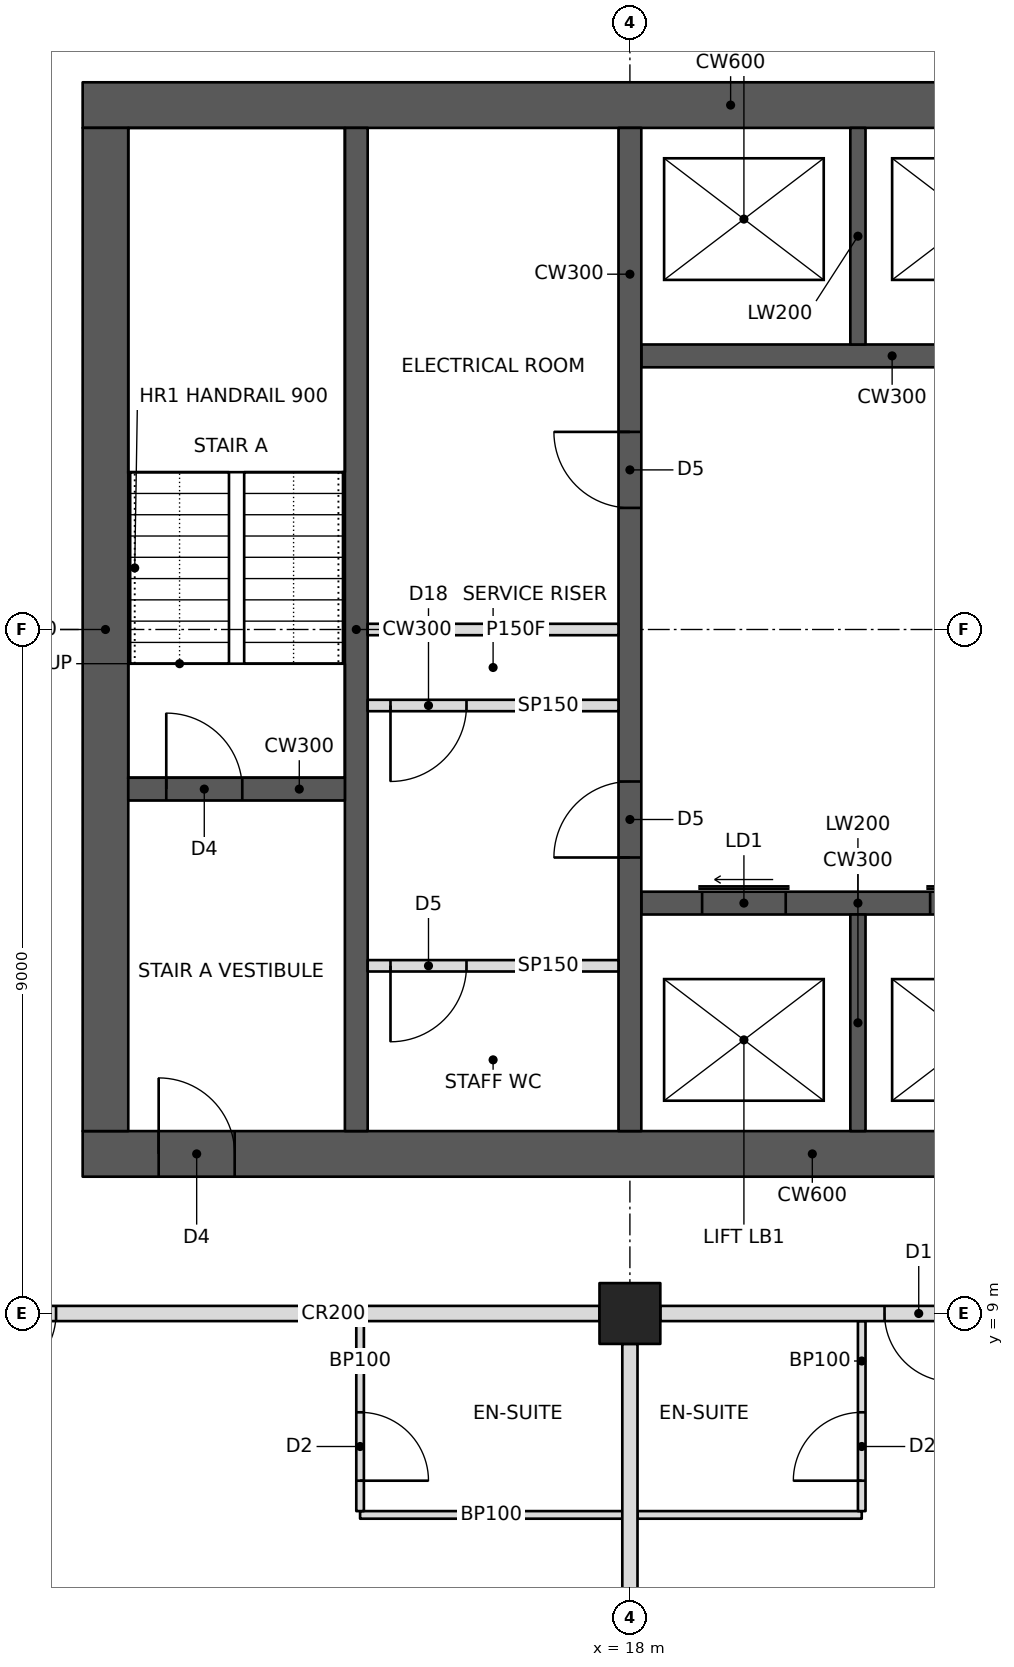
"""IFC4 building model, lengths in metres.
Left out: names, types, materials, properties, quantities, classifications, styles, units other than length and angle.
Written with IfcOpenShell. Run it as: python <this file> out.ifc"""

import sys

from ifc_helpers import new_model, si_unit, direction, frame, frame_2d, origin, origin_2d, place, context, subcontext, project, spatial, rectangle, hollow_rectangle, extrude, element, fill, save


model = new_model("IFC4")
c1 = context("Model", 3, precision=1e-05, world=origin(), true_north=direction((0.0, 1.0)))
c2 = subcontext(c1, "Body", "Model", "MODEL_VIEW")
j1 = project(units=[si_unit("LENGTHUNIT", "METRE"), si_unit("PLANEANGLEUNIT", "RADIAN")], contexts=[c1])
p1 = place(None, origin())
s1 = spatial("IfcSite", under=j1, at=p1, CompositionType="ELEMENT")
p2 = place(p1, origin())
s2 = spatial("IfcBuilding", under=s1, at=p2, CompositionType="ELEMENT")
p3 = place(p2, frame((0.0, 0.0, 148.6)))
s3 = spatial("IfcBuildingStorey", under=s2, at=p3, CompositionType="ELEMENT", Elevation=148.6)
p4 = place(p3, frame((18.0, 9.0, 0.0), z_axis=(0.0, 0.0, 1.0), x_axis=(1.0, 0.0, 0.0)))
e1 = element("IfcColumn", 1, at=p4, inside=s3, PredefinedType="COLUMN", context=c2, shape_type="SweptSolid", body=[
    extrude(hollow_rectangle(XDim=0.8, YDim=0.8, WallThickness=0.07, at=origin_2d()), origin(), (0.0, 0.0, 1.0), 3.4),
])
p5 = place(p3, frame((10.8, 11.1, 0.0), z_axis=(0.0, 0.0, 1.0), x_axis=(1.0, 0.0, 0.0)))
e2 = element("IfcWall", 2, at=p5, inside=s3, PredefinedType="SHEAR", context=c2, shape_type="SweptSolid", body=[
    extrude(rectangle(XDim=23.4, YDim=0.6, at=frame_2d((11.7, 0.0))), origin(), (0.0, 0.0, 1.0), 3.4),
])
p6 = place(p5, frame((1.0, 0.0, 0.0)))
e3 = element("IfcOpeningElement", 3, at=p6, cuts=e2, PredefinedType="OPENING", context=c2, shape_type="SweptSolid", body=[
    extrude(rectangle(XDim=1.0, YDim=2.1, at=frame_2d((0.5, 1.05))), frame((0.0, 0.31, 0.0), z_axis=(0.0, -1.0, 0.0), x_axis=(1.0, 0.0, 0.0)), (0.0, 0.0, 1.0), 0.62),
])
p7 = place(p5, frame((17.2, 0.0, 0.0)))
e4 = element("IfcOpeningElement", 4, at=p7, cuts=e2, PredefinedType="OPENING", context=c2, shape_type="SweptSolid", body=[
    extrude(rectangle(XDim=1.8, YDim=2.1, at=frame_2d((0.9, 1.05))), frame((0.0, 0.31, 0.0), z_axis=(0.0, -1.0, 0.0), x_axis=(1.0, 0.0, 0.0)), (0.0, 0.0, 1.0), 0.62),
])
p8 = place(p3, frame((10.8, 24.9, 0.0), z_axis=(0.0, 0.0, 1.0), x_axis=(1.0, 0.0, 0.0)))
e5 = element("IfcWall", 5, at=p8, inside=s3, PredefinedType="SHEAR", context=c2, shape_type="SweptSolid", body=[
    extrude(rectangle(XDim=23.4, YDim=0.6, at=frame_2d((11.7, 0.0))), origin(), (0.0, 0.0, 1.0), 3.4),
])
p9 = place(p8, frame((17.2, 0.0, 0.0)))
e6 = element("IfcOpeningElement", 6, at=p9, cuts=e5, PredefinedType="OPENING", context=c2, shape_type="SweptSolid", body=[
    extrude(rectangle(XDim=1.8, YDim=2.1, at=frame_2d((0.9, 1.05))), frame((0.0, 0.31, 0.0), z_axis=(0.0, -1.0, 0.0), x_axis=(1.0, 0.0, 0.0)), (0.0, 0.0, 1.0), 0.62),
])
p10 = place(p8, frame((21.1, 0.0, 0.0)))
e7 = element("IfcOpeningElement", 7, at=p10, cuts=e5, PredefinedType="OPENING", context=c2, shape_type="SweptSolid", body=[
    extrude(rectangle(XDim=1.0, YDim=2.1, at=frame_2d((0.5, 1.05))), frame((0.0, 0.31, 0.0), z_axis=(0.0, -1.0, 0.0), x_axis=(1.0, 0.0, 0.0)), (0.0, 0.0, 1.0), 0.62),
])
p11 = place(p3, frame((11.1, 11.4, 0.0), z_axis=(0.0, 0.0, 1.0), x_axis=(0.0, 1.0, 0.0)))
e8 = element("IfcWall", 8, at=p11, inside=s3, PredefinedType="SHEAR", context=c2, shape_type="SweptSolid", body=[
    extrude(rectangle(XDim=13.2, YDim=0.6, at=frame_2d((6.6, 0.0))), origin(), (0.0, 0.0, 1.0), 3.4),
])
p12 = place(p3, frame((14.4, 11.4, 0.0), z_axis=(0.0, 0.0, 1.0), x_axis=(0.0, 1.0, 0.0)))
e9 = element("IfcWall", 9, at=p12, inside=s3, PredefinedType="SHEAR", context=c2, shape_type="SweptSolid", body=[
    extrude(rectangle(XDim=13.2, YDim=0.3, at=frame_2d((6.6, 0.0))), origin(), (0.0, 0.0, 1.0), 3.4),
])
p13 = place(p3, frame((11.4, 15.9, 0.0), z_axis=(0.0, 0.0, 1.0), x_axis=(1.0, 0.0, 0.0)))
e10 = element("IfcWall", 10, at=p13, inside=s3, PredefinedType="SHEAR", context=c2, shape_type="SweptSolid", body=[
    extrude(rectangle(XDim=2.85, YDim=0.3, at=frame_2d((1.425, 0.0))), origin(), (0.0, 0.0, 1.0), 3.4),
])
p14 = place(p13, frame((0.5, 0.0, 0.0)))
e11 = element("IfcOpeningElement", 11, at=p14, cuts=e10, PredefinedType="OPENING", context=c2, shape_type="SweptSolid", body=[
    extrude(rectangle(XDim=1.0, YDim=2.1, at=frame_2d((0.5, 1.05))), frame((0.0, 0.16, 0.0), z_axis=(0.0, -1.0, 0.0), x_axis=(1.0, 0.0, 0.0)), (0.0, 0.0, 1.0), 0.32),
])
p15 = place(p3, frame((18.0, 11.4, 0.0), z_axis=(0.0, 0.0, 1.0), x_axis=(0.0, 1.0, 0.0)))
e12 = element("IfcWall", 12, at=p15, inside=s3, PredefinedType="SHEAR", context=c2, shape_type="SweptSolid", body=[
    extrude(rectangle(XDim=13.2, YDim=0.3, at=frame_2d((6.6, 0.0))), origin(), (0.0, 0.0, 1.0), 3.4),
])
p16 = place(p15, frame((3.6, 0.0, 0.0)))
e13 = element("IfcOpeningElement", 13, at=p16, cuts=e12, PredefinedType="OPENING", context=c2, shape_type="SweptSolid", body=[
    extrude(rectangle(XDim=1.0, YDim=2.1, at=frame_2d((0.5, 1.05))), frame((0.0, 0.16, 0.0), z_axis=(0.0, -1.0, 0.0), x_axis=(1.0, 0.0, 0.0)), (0.0, 0.0, 1.0), 0.32),
])
p17 = place(p15, frame((8.2, 0.0, 0.0)))
e14 = element("IfcOpeningElement", 14, at=p17, cuts=e12, PredefinedType="OPENING", context=c2, shape_type="SweptSolid", body=[
    extrude(rectangle(XDim=1.0, YDim=2.1, at=frame_2d((0.5, 1.05))), frame((0.0, 0.16, 0.0), z_axis=(0.0, -1.0, 0.0), x_axis=(1.0, 0.0, 0.0)), (0.0, 0.0, 1.0), 0.32),
])
p18 = place(p3, frame((14.55, 18.0, 0.0), z_axis=(0.0, 0.0, 1.0), x_axis=(1.0, 0.0, 0.0)))
e15 = element("IfcWall", 15, at=p18, inside=s3, PredefinedType="PARTITIONING", context=c2, shape_type="SweptSolid", body=[
    extrude(rectangle(XDim=3.3, YDim=0.15, at=frame_2d((1.65, 0.0))), origin(), (0.0, 0.0, 1.0), 3.2),
])
p19 = place(p3, frame((18.15, 14.4, 0.0), z_axis=(0.0, 0.0, 1.0), x_axis=(1.0, 0.0, 0.0)))
e16 = element("IfcWall", 16, at=p19, inside=s3, PredefinedType="SHEAR", context=c2, shape_type="SweptSolid", body=[
    extrude(rectangle(XDim=9.0, YDim=0.3, at=frame_2d((4.5, 0.0))), origin(), (0.0, 0.0, 1.0), 3.4),
])
p20 = place(p19, frame((0.8, 0.0, 0.0)))
e17 = element("IfcOpeningElement", 17, at=p20, cuts=e16, PredefinedType="OPENING", context=c2, shape_type="SweptSolid", body=[
    extrude(rectangle(XDim=1.1, YDim=2.1, at=frame_2d((0.55, 1.05))), frame((0.0, 0.16, 0.0), z_axis=(0.0, -1.0, 0.0), x_axis=(1.0, 0.0, 0.0)), (0.0, 0.0, 1.0), 0.32),
])
p21 = place(p19, frame((3.8, 0.0, 0.0)))
e18 = element("IfcOpeningElement", 18, at=p21, cuts=e16, PredefinedType="OPENING", context=c2, shape_type="SweptSolid", body=[
    extrude(rectangle(XDim=1.1, YDim=2.1, at=frame_2d((0.55, 1.05))), frame((0.0, 0.16, 0.0), z_axis=(0.0, -1.0, 0.0), x_axis=(1.0, 0.0, 0.0)), (0.0, 0.0, 1.0), 0.32),
])
p22 = place(p19, frame((6.75, 0.0, 0.0)))
e19 = element("IfcOpeningElement", 19, at=p22, cuts=e16, PredefinedType="OPENING", context=c2, shape_type="SweptSolid", body=[
    extrude(rectangle(XDim=1.2, YDim=2.1, at=frame_2d((0.6, 1.05))), frame((0.0, 0.16, 0.0), z_axis=(0.0, -1.0, 0.0), x_axis=(1.0, 0.0, 0.0)), (0.0, 0.0, 1.0), 0.32),
])
p23 = place(p3, frame((21.0, 11.4, 0.0), z_axis=(0.0, 0.0, 1.0), x_axis=(0.0, 1.0, 0.0)))
e20 = element("IfcWall", 20, at=p23, inside=s3, PredefinedType="SHEAR", context=c2, shape_type="SweptSolid", body=[
    extrude(rectangle(XDim=2.85, YDim=0.2, at=frame_2d((1.425, 0.0))), origin(), (0.0, 0.0, 1.0), 3.4),
])
p24 = place(p3, frame((18.15, 21.6, 0.0), z_axis=(0.0, 0.0, 1.0), x_axis=(1.0, 0.0, 0.0)))
e21 = element("IfcWall", 21, at=p24, inside=s3, PredefinedType="SHEAR", context=c2, shape_type="SweptSolid", body=[
    extrude(rectangle(XDim=9.0, YDim=0.3, at=frame_2d((4.5, 0.0))), origin(), (0.0, 0.0, 1.0), 3.4),
])
p25 = place(p24, frame((6.75, 0.0, 0.0)))
e22 = element("IfcOpeningElement", 22, at=p25, cuts=e21, PredefinedType="OPENING", context=c2, shape_type="SweptSolid", body=[
    extrude(rectangle(XDim=1.2, YDim=2.1, at=frame_2d((0.6, 1.05))), frame((0.0, 0.16, 0.0), z_axis=(0.0, -1.0, 0.0), x_axis=(1.0, 0.0, 0.0)), (0.0, 0.0, 1.0), 0.32),
])
p26 = place(p3, frame((21.0, 21.75, 0.0), z_axis=(0.0, 0.0, 1.0), x_axis=(0.0, 1.0, 0.0)))
e23 = element("IfcWall", 23, at=p26, inside=s3, PredefinedType="SHEAR", context=c2, shape_type="SweptSolid", body=[
    extrude(rectangle(XDim=2.85, YDim=0.2, at=frame_2d((1.425, 0.0))), origin(), (0.0, 0.0, 1.0), 3.4),
])
p27 = place(p3, frame((9.4, 9.0, 0.0), z_axis=(0.0, 0.0, 1.0), x_axis=(1.0, 0.0, 0.0)))
e24 = element("IfcWall", 24, at=p27, inside=s3, PredefinedType="PARTITIONING", context=c2, shape_type="SweptSolid", body=[
    extrude(rectangle(XDim=8.2, YDim=0.2, at=frame_2d((4.1, 0.0))), origin(), (0.0, 0.0, 1.0), 2.405),
])
p28 = place(p27, frame((0.15, 0.0, 0.0)))
e25 = element("IfcOpeningElement", 25, at=p28, cuts=e24, PredefinedType="OPENING", context=c2, shape_type="SweptSolid", body=[
    extrude(rectangle(XDim=0.9, YDim=2.1, at=frame_2d((0.45, 1.05))), frame((0.0, 0.11, 0.0), z_axis=(0.0, -1.0, 0.0), x_axis=(1.0, 0.0, 0.0)), (0.0, 0.0, 1.0), 0.22),
])
p29 = place(p3, frame((18.4, 9.0, 0.0), z_axis=(0.0, 0.0, 1.0), x_axis=(1.0, 0.0, 0.0)))
e26 = element("IfcWall", 26, at=p29, inside=s3, PredefinedType="PARTITIONING", context=c2, shape_type="SweptSolid", body=[
    extrude(rectangle(XDim=8.2, YDim=0.2, at=frame_2d((4.1, 0.0))), origin(), (0.0, 0.0, 1.0), 2.405),
])
p30 = place(p29, frame((2.95, 0.0, 0.0)))
e27 = element("IfcOpeningElement", 27, at=p30, cuts=e26, PredefinedType="OPENING", context=c2, shape_type="SweptSolid", body=[
    extrude(rectangle(XDim=0.9, YDim=2.1, at=frame_2d((0.45, 1.05))), frame((0.0, 0.11, 0.0), z_axis=(0.0, -1.0, 0.0), x_axis=(1.0, 0.0, 0.0)), (0.0, 0.0, 1.0), 0.22),
])
p31 = place(p29, frame((4.35, 0.0, 0.0)))
e28 = element("IfcOpeningElement", 28, at=p31, cuts=e26, PredefinedType="OPENING", context=c2, shape_type="SweptSolid", body=[
    extrude(rectangle(XDim=0.9, YDim=2.1, at=frame_2d((0.45, 1.05))), frame((0.0, 0.11, 0.0), z_axis=(0.0, -1.0, 0.0), x_axis=(1.0, 0.0, 0.0)), (0.0, 0.0, 1.0), 0.22),
])
p32 = place(p3, frame((18.0, 8.6, 0.0), z_axis=(0.0, 0.0, 1.0), x_axis=(0.0, -1.0, 0.0)))
e29 = element("IfcWall", 29, at=p32, inside=s3, PredefinedType="PARTITIONING", context=c2, shape_type="SweptSolid", body=[
    extrude(rectangle(XDim=7.6, YDim=0.2, at=frame_2d((3.8, 0.0))), origin(), (0.0, 0.0, 1.0), 2.405),
])
p33 = place(p3, frame((14.45, 6.35, 0.0), z_axis=(0.0, 0.0, 1.0), x_axis=(1.0, 0.0, 0.0)))
e30 = element("IfcWall", 30, at=p33, inside=s3, PredefinedType="PARTITIONING", context=c2, shape_type="SweptSolid", body=[
    extrude(rectangle(XDim=3.45, YDim=0.1, at=frame_2d((1.725, 0.0))), origin(), (0.0, 0.0, 1.0), 2.404),
])
p34 = place(p3, frame((14.45, 8.9, 0.0), z_axis=(0.0, 0.0, 1.0), x_axis=(0.0, -1.0, 0.0)))
e31 = element("IfcWall", 31, at=p34, inside=s3, PredefinedType="PARTITIONING", context=c2, shape_type="SweptSolid", body=[
    extrude(rectangle(XDim=2.5, YDim=0.1, at=frame_2d((1.25, 0.0))), origin(), (0.0, 0.0, 1.0), 2.404),
])
p35 = place(p34, frame((1.2, 0.0, 0.0)))
e32 = element("IfcOpeningElement", 32, at=p35, cuts=e31, PredefinedType="OPENING", context=c2, shape_type="SweptSolid", body=[
    extrude(rectangle(XDim=0.9, YDim=2.1, at=frame_2d((0.45, 1.05))), frame((0.0, 0.06, 0.0), z_axis=(0.0, -1.0, 0.0), x_axis=(1.0, 0.0, 0.0)), (0.0, 0.0, 1.0), 0.12),
])
p36 = place(p3, frame((18.1, 6.35, 0.0), z_axis=(0.0, 0.0, 1.0), x_axis=(1.0, 0.0, 0.0)))
e33 = element("IfcWall", 33, at=p36, inside=s3, PredefinedType="PARTITIONING", context=c2, shape_type="SweptSolid", body=[
    extrude(rectangle(XDim=2.95, YDim=0.1, at=frame_2d((1.475, 0.0))), origin(), (0.0, 0.0, 1.0), 2.404),
])
p37 = place(p3, frame((21.05, 8.9, 0.0), z_axis=(0.0, 0.0, 1.0), x_axis=(0.0, -1.0, 0.0)))
e34 = element("IfcWall", 34, at=p37, inside=s3, PredefinedType="PARTITIONING", context=c2, shape_type="SweptSolid", body=[
    extrude(rectangle(XDim=2.5, YDim=0.1, at=frame_2d((1.25, 0.0))), origin(), (0.0, 0.0, 1.0), 2.404),
])
p38 = place(p37, frame((1.2, 0.0, 0.0)))
e35 = element("IfcOpeningElement", 35, at=p38, cuts=e34, PredefinedType="OPENING", context=c2, shape_type="SweptSolid", body=[
    extrude(rectangle(XDim=0.9, YDim=2.1, at=frame_2d((0.45, 1.05))), frame((0.0, 0.06, 0.0), z_axis=(0.0, -1.0, 0.0), x_axis=(1.0, 0.0, 0.0)), (0.0, 0.0, 1.0), 0.12),
])
p39 = place(p3, frame((14.55, 17.0, 0.0), z_axis=(0.0, 0.0, 1.0), x_axis=(1.0, 0.0, 0.0)))
e36 = element("IfcWall", 36, at=p39, inside=s3, PredefinedType="PARTITIONING", context=c2, shape_type="SweptSolid", body=[
    extrude(rectangle(XDim=3.3, YDim=0.15, at=frame_2d((1.65, 0.0))), origin(), (0.0, 0.0, 1.0), 3.2),
])
p40 = place(p39, frame((0.3, 0.0, 0.0)))
e37 = element("IfcOpeningElement", 37, at=p40, cuts=e36, PredefinedType="OPENING", context=c2, shape_type="SweptSolid", body=[
    extrude(rectangle(XDim=1.0, YDim=2.1, at=frame_2d((0.5, 1.05))), frame((0.0, 0.085, 0.0), z_axis=(0.0, -1.0, 0.0), x_axis=(1.0, 0.0, 0.0)), (0.0, 0.0, 1.0), 0.17),
])
p41 = place(p3, frame((14.55, 13.575, 0.0), z_axis=(0.0, 0.0, 1.0), x_axis=(1.0, 0.0, 0.0)))
e38 = element("IfcWall", 38, at=p41, inside=s3, PredefinedType="PARTITIONING", context=c2, shape_type="SweptSolid", body=[
    extrude(rectangle(XDim=3.3, YDim=0.15, at=frame_2d((1.65, 0.0))), origin(), (0.0, 0.0, 1.0), 3.2),
])
p42 = place(p41, frame((0.3, 0.0, 0.0)))
e39 = element("IfcOpeningElement", 39, at=p42, cuts=e38, PredefinedType="OPENING", context=c2, shape_type="SweptSolid", body=[
    extrude(rectangle(XDim=1.0, YDim=2.1, at=frame_2d((0.5, 1.05))), frame((0.0, 0.085, 0.0), z_axis=(0.0, -1.0, 0.0), x_axis=(1.0, 0.0, 0.0)), (0.0, 0.0, 1.0), 0.17),
])
p43 = place(p35, origin())
e40 = element("IfcDoor", 40, at=p43, inside=s3, OperationType="SINGLE_SWING_RIGHT", PredefinedType="DOOR", context=c2, shape_type="SweptSolid", body=[
    extrude(rectangle(XDim=0.9, YDim=2.1, at=frame_2d((0.45, 1.05))), frame((0.0, 0.025, 0.0), z_axis=(0.0, -1.0, 0.0), x_axis=(1.0, 0.0, 0.0)), (0.0, 0.0, 1.0), 0.05),
])
fill(e32, e40)
p44 = place(p28, frame((0.9, 0.0, 0.0), z_axis=(0.0, 0.0, 1.0), x_axis=(-1.0, 0.0, 0.0)))
e41 = element("IfcDoor", 41, at=p44, inside=s3, OperationType="SINGLE_SWING_RIGHT", PredefinedType="DOOR", context=c2, shape_type="SweptSolid", body=[
    extrude(rectangle(XDim=0.9, YDim=2.1, at=frame_2d((0.45, 1.05))), frame((0.0, 0.025, 0.0), z_axis=(0.0, -1.0, 0.0), x_axis=(1.0, 0.0, 0.0)), (0.0, 0.0, 1.0), 0.05),
])
fill(e25, e41)
p45 = place(p38, frame((0.9, 0.0, 0.0), z_axis=(0.0, 0.0, 1.0), x_axis=(-1.0, 0.0, 0.0)))
e42 = element("IfcDoor", 42, at=p45, inside=s3, OperationType="SINGLE_SWING_LEFT", PredefinedType="DOOR", context=c2, shape_type="SweptSolid", body=[
    extrude(rectangle(XDim=0.9, YDim=2.1, at=frame_2d((0.45, 1.05))), frame((0.0, 0.025, 0.0), z_axis=(0.0, -1.0, 0.0), x_axis=(1.0, 0.0, 0.0)), (0.0, 0.0, 1.0), 0.05),
])
fill(e35, e42)
p46 = place(p30, frame((0.9, 0.0, 0.0), z_axis=(0.0, 0.0, 1.0), x_axis=(-1.0, 0.0, 0.0)))
e43 = element("IfcDoor", 43, at=p46, inside=s3, OperationType="SINGLE_SWING_LEFT", PredefinedType="DOOR", context=c2, shape_type="SweptSolid", body=[
    extrude(rectangle(XDim=0.9, YDim=2.1, at=frame_2d((0.45, 1.05))), frame((0.0, 0.025, 0.0), z_axis=(0.0, -1.0, 0.0), x_axis=(1.0, 0.0, 0.0)), (0.0, 0.0, 1.0), 0.05),
])
fill(e27, e43)
p47 = place(p40, frame((1.0, 0.0, 0.0), z_axis=(0.0, 0.0, 1.0), x_axis=(-1.0, 0.0, 0.0)))
e44 = element("IfcDoor", 44, at=p47, inside=s3, OperationType="SINGLE_SWING_RIGHT", PredefinedType="DOOR", context=c2, shape_type="SweptSolid", body=[
    extrude(rectangle(XDim=1.0, YDim=2.1, at=frame_2d((0.5, 1.05))), frame((0.0, 0.025, 0.0), z_axis=(0.0, -1.0, 0.0), x_axis=(1.0, 0.0, 0.0)), (0.0, 0.0, 1.0), 0.05),
])
fill(e37, e44)
p48 = place(p42, frame((1.0, 0.0, 0.0), z_axis=(0.0, 0.0, 1.0), x_axis=(-1.0, 0.0, 0.0)))
e45 = element("IfcDoor", 45, at=p48, inside=s3, OperationType="SINGLE_SWING_RIGHT", PredefinedType="DOOR", context=c2, shape_type="SweptSolid", body=[
    extrude(rectangle(XDim=1.0, YDim=2.1, at=frame_2d((0.5, 1.05))), frame((0.0, 0.025, 0.0), z_axis=(0.0, -1.0, 0.0), x_axis=(1.0, 0.0, 0.0)), (0.0, 0.0, 1.0), 0.05),
])
fill(e39, e45)
p49 = place(p6, origin())
e46 = element("IfcDoor", 46, at=p49, inside=s3, OperationType="SINGLE_SWING_LEFT", PredefinedType="DOOR", context=c2, shape_type="SweptSolid", body=[
    extrude(rectangle(XDim=1.0, YDim=2.1, at=frame_2d((0.5, 1.05))), frame((0.0, 0.025, 0.0), z_axis=(0.0, -1.0, 0.0), x_axis=(1.0, 0.0, 0.0)), (0.0, 0.0, 1.0), 0.05),
])
fill(e3, e46)
p50 = place(p14, origin())
e47 = element("IfcDoor", 47, at=p50, inside=s3, OperationType="SINGLE_SWING_LEFT", PredefinedType="DOOR", context=c2, shape_type="SweptSolid", body=[
    extrude(rectangle(XDim=1.0, YDim=2.1, at=frame_2d((0.5, 1.05))), frame((0.0, 0.025, 0.0), z_axis=(0.0, -1.0, 0.0), x_axis=(1.0, 0.0, 0.0)), (0.0, 0.0, 1.0), 0.05),
])
fill(e11, e47)
p51 = place(p16, origin())
e48 = element("IfcDoor", 48, at=p51, inside=s3, OperationType="SINGLE_SWING_LEFT", PredefinedType="DOOR", context=c2, shape_type="SweptSolid", body=[
    extrude(rectangle(XDim=1.0, YDim=2.1, at=frame_2d((0.5, 1.05))), frame((0.0, 0.025, 0.0), z_axis=(0.0, -1.0, 0.0), x_axis=(1.0, 0.0, 0.0)), (0.0, 0.0, 1.0), 0.05),
])
fill(e13, e48)
p52 = place(p17, origin())
e49 = element("IfcDoor", 49, at=p52, inside=s3, OperationType="SINGLE_SWING_RIGHT", PredefinedType="DOOR", context=c2, shape_type="SweptSolid", body=[
    extrude(rectangle(XDim=1.0, YDim=2.1, at=frame_2d((0.5, 1.05))), frame((0.0, 0.025, 0.0), z_axis=(0.0, -1.0, 0.0), x_axis=(1.0, 0.0, 0.0)), (0.0, 0.0, 1.0), 0.05),
])
fill(e14, e49)
p53 = place(p20, origin())
e50 = element("IfcDoor", 50, at=p53, inside=s3, OperationType="SLIDING_TO_LEFT", PredefinedType="DOOR", context=c2, shape_type="SweptSolid", body=[
    extrude(rectangle(XDim=1.1, YDim=2.1, at=frame_2d((0.55, 1.05))), frame((0.0, 0.025, 0.0), z_axis=(0.0, -1.0, 0.0), x_axis=(1.0, 0.0, 0.0)), (0.0, 0.0, 1.0), 0.05),
])
fill(e17, e50)
p54 = place(p21, origin())
e51 = element("IfcDoor", 51, at=p54, inside=s3, OperationType="SLIDING_TO_LEFT", PredefinedType="DOOR", context=c2, shape_type="SweptSolid", body=[
    extrude(rectangle(XDim=1.1, YDim=2.1, at=frame_2d((0.55, 1.05))), frame((0.0, 0.025, 0.0), z_axis=(0.0, -1.0, 0.0), x_axis=(1.0, 0.0, 0.0)), (0.0, 0.0, 1.0), 0.05),
])
fill(e18, e51)
save(model, sys.argv[1])
